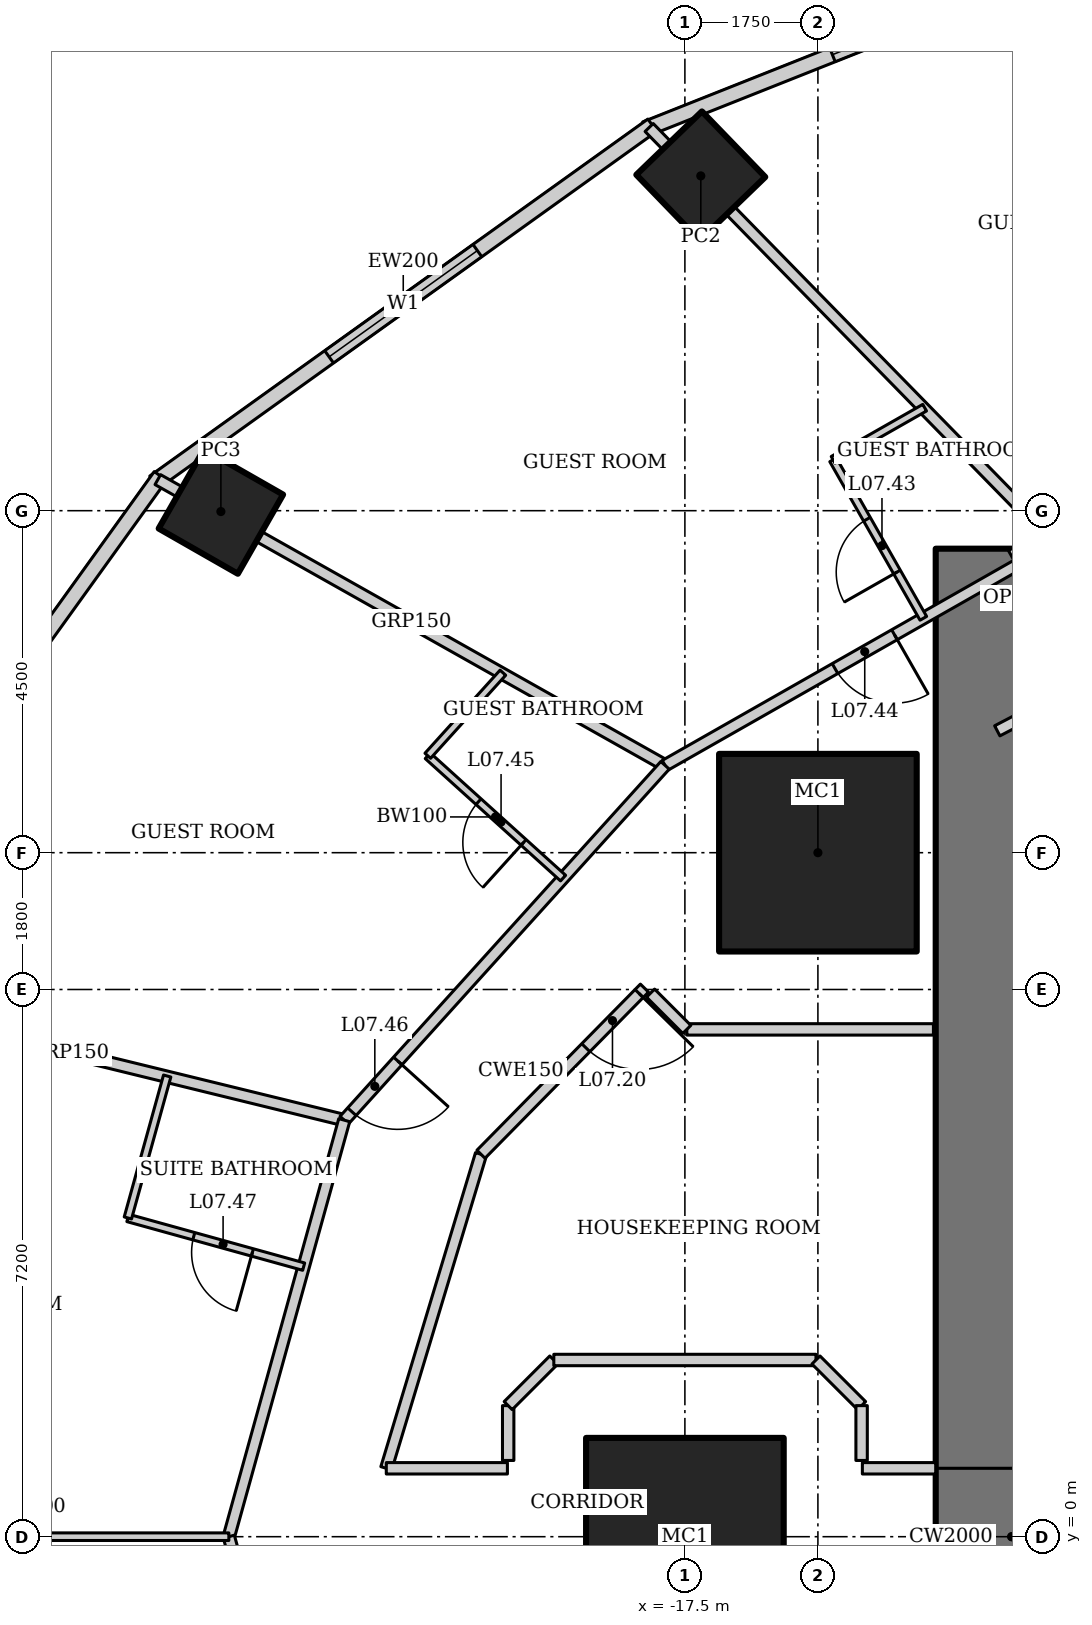
"""IFC4 building model, lengths in metres.
Left out: names, types, materials, properties, quantities, classifications, styles, units other than length and angle.
Written with IfcOpenShell. Run it as: python <this file> out.ifc"""

import sys

from ifc_helpers import new_model, si_unit, direction, frame, frame_2d, origin, origin_2d, place, context, subcontext, project, spatial, rectangle, hollow_rectangle, extrude, element, fill, save


model = new_model("IFC4")
c1 = context("Model", 3, precision=1e-05, world=origin(), true_north=direction((0.0, 1.0)))
c2 = subcontext(c1, "Body", "Model", "MODEL_VIEW")
j1 = project(units=[si_unit("LENGTHUNIT", "METRE"), si_unit("PLANEANGLEUNIT", "RADIAN")], contexts=[c1])
p1 = place(None, origin())
s1 = spatial("IfcSite", under=j1, at=p1, CompositionType="ELEMENT")
p2 = place(p1, origin())
s2 = spatial("IfcBuilding", under=s1, at=p2, CompositionType="ELEMENT")
p3 = place(p2, frame((0.0, 0.0, 40.6)))
s3 = spatial("IfcBuildingStorey", under=s2, at=p3, CompositionType="ELEMENT", Elevation=40.6)
for number, where, z_axis, x_axis in (
    (1, (-15.75, 9.0, 0.0), (0.0, 0.0, 1.0), (1.0, 0.0, 0.0)),
    (2, (-17.5, 0.0, 0.0), (0.0, 0.0, 1.0), (1.0, 0.0, 0.0)),
):
    element("IfcColumn", number, at=place(p3, frame(where, z_axis=z_axis, x_axis=x_axis)), inside=s3, PredefinedType="COLUMN", context=c2, shape_type="SweptSolid", body=[
        extrude(hollow_rectangle(XDim=2.6, YDim=2.6, WallThickness=0.13, at=origin_2d()), origin(), (0.0, 0.0, 1.0), 3.6),
    ])
p4 = place(p3, frame((-17.291, 17.905, 0.0), z_axis=(0.0, 0.0, 1.0), x_axis=(0.719339800339, 0.694658370459, 0.0)))
e3 = element("IfcColumn", 3, at=p4, inside=s3, PredefinedType="COLUMN", context=c2, shape_type="SweptSolid", body=[
    extrude(hollow_rectangle(XDim=1.2, YDim=1.2, WallThickness=0.1, at=origin_2d()), origin(), (0.0, 0.0, 1.0), 3.6),
])
p5 = place(p3, frame((-23.605, 13.489, 0.0), z_axis=(0.0, 0.0, 1.0), x_axis=(0.496139221777, 0.86824298017, 0.0)))
e4 = element("IfcColumn", 4, at=p5, inside=s3, PredefinedType="COLUMN", context=c2, shape_type="SweptSolid", body=[
    extrude(hollow_rectangle(XDim=1.2, YDim=1.2, WallThickness=0.12, at=origin_2d()), origin(), (0.0, 0.0, 1.0), 3.6),
])
p6 = place(p3, frame((-13.2, 13.0, 0.0), z_axis=(0.0, 0.0, 1.0), x_axis=(0.0, -1.0, 0.0)))
e5 = element("IfcWall", 5, at=p6, inside=s3, PredefinedType="SHEAR", context=c2, shape_type="SweptSolid", body=[
    extrude(rectangle(XDim=26.0, YDim=2.0, at=frame_2d((13.0, 0.0))), origin(), (0.0, 0.0, 1.0), 3.6),
])
p7 = place(p6, frame((12.1, 0.0, 0.0)))
e6 = element("IfcOpeningElement", 6, at=p7, cuts=e5, PredefinedType="OPENING", context=c2, shape_type="SweptSolid", body=[
    extrude(rectangle(XDim=1.8, YDim=2.1, at=frame_2d((0.9, 1.05))), frame((0.0, 1.01, 0.0), z_axis=(0.0, -1.0, 0.0), x_axis=(1.0, 0.0, 0.0)), (0.0, 0.0, 1.0), 2.02),
])
p8 = place(p3, frame((-10.869, 21.363, 0.0), z_axis=(0.0, 0.0, 1.0), x_axis=(-0.929358351251, -0.369178892895, 0.0)))
e7 = element("IfcWall", 7, at=p8, inside=s3, PredefinedType="SOLIDWALL", context=c2, shape_type="SweptSolid", body=[
    extrude(rectangle(XDim=7.692, YDim=0.2, at=frame_2d((3.846, 0.0))), origin(), (0.0, 0.0, 1.0), 3.45),
])
p9 = place(p8, frame((2.646, 0.0, 0.5)))
e8 = element("IfcOpeningElement", 8, at=p9, cuts=e7, PredefinedType="OPENING", context=c2, shape_type="SweptSolid", body=[
    extrude(rectangle(XDim=2.4, YDim=2.2, at=frame_2d((1.2, 1.1))), frame((0.0, 0.11, 0.0), z_axis=(0.0, -1.0, 0.0), x_axis=(1.0, 0.0, 0.0)), (0.0, 0.0, 1.0), 0.22),
])
p10 = place(p3, frame((-17.929, 18.572, 0.0), z_axis=(0.0, 0.0, 1.0), x_axis=(-0.812791321576, -0.582554948112, 0.0)))
e9 = element("IfcWall", 9, at=p10, inside=s3, PredefinedType="SOLIDWALL", context=c2, shape_type="SweptSolid", body=[
    extrude(rectangle(XDim=8.063, YDim=0.2, at=frame_2d((4.032, 0.0))), origin(), (0.0, 0.0, 1.0), 3.45),
])
p11 = place(p10, frame((2.832, 0.0, 0.5)))
e10 = element("IfcOpeningElement", 10, at=p11, cuts=e9, PredefinedType="OPENING", context=c2, shape_type="SweptSolid", body=[
    extrude(rectangle(XDim=2.4, YDim=2.2, at=frame_2d((1.2, 1.1))), frame((0.0, 0.11, 0.0), z_axis=(0.0, -1.0, 0.0), x_axis=(1.0, 0.0, 0.0)), (0.0, 0.0, 1.0), 0.22),
])
p12 = place(p3, frame((-24.4, 13.957, 0.0), z_axis=(0.0, 0.0, 1.0), x_axis=(-0.583937613703, -0.811798536155, 0.0)))
e11 = element("IfcWall", 11, at=p12, inside=s3, PredefinedType="SOLIDWALL", context=c2, shape_type="SweptSolid", body=[
    extrude(rectangle(XDim=8.323, YDim=0.2, at=frame_2d((4.162, 0.0))), origin(), (0.0, 0.0, 1.0), 3.45),
])
p13 = place(p12, frame((2.961, 0.0, 0.5)))
e12 = element("IfcOpeningElement", 12, at=p13, cuts=e11, PredefinedType="OPENING", context=c2, shape_type="SweptSolid", body=[
    extrude(rectangle(XDim=2.4, YDim=2.2, at=frame_2d((1.2, 1.1))), frame((0.0, 0.11, 0.0), z_axis=(0.0, -1.0, 0.0), x_axis=(1.0, 0.0, 0.0)), (0.0, 0.0, 1.0), 0.22),
])
p14 = place(p3, frame((-17.97, 18.542, 0.0), z_axis=(0.0, 0.0, 1.0), x_axis=(0.699032031211, -0.715090357467, 0.0)))
e13 = element("IfcWall", 13, at=p14, inside=s3, PredefinedType="PARTITIONING", context=c2, shape_type="SweptSolid", body=[
    extrude(rectangle(XDim=7.647, YDim=0.15, at=frame_2d((3.824, 0.0))), origin(), (0.0, 0.0, 1.0), 2.528),
])
p15 = place(p3, frame((-24.435, 13.909, 0.0), z_axis=(0.0, 0.0, 1.0), x_axis=(0.871267209855, -0.490808974074, 0.0)))
e14 = element("IfcWall", 14, at=p15, inside=s3, PredefinedType="PARTITIONING", context=c2, shape_type="SweptSolid", body=[
    extrude(rectangle(XDim=7.659, YDim=0.15, at=frame_2d((3.83, 0.0))), origin(), (0.0, 0.0, 1.0), 2.693),
])
p16 = place(p3, frame((-29.222, 7.254, 0.0), z_axis=(0.0, 0.0, 1.0), x_axis=(0.97130070913, -0.237854855832, 0.0)))
e15 = element("IfcWall", 15, at=p16, inside=s3, PredefinedType="PARTITIONING", context=c2, shape_type="SweptSolid", body=[
    extrude(rectangle(XDim=7.454, YDim=0.15, at=frame_2d((3.727, 0.0))), origin(), (0.0, 0.0, 1.0), 2.332),
])
p17 = place(p3, frame((-12.625, 13.073, 0.0), z_axis=(0.0, 0.0, 1.0), x_axis=(-0.86907565943, -0.494679187136, 0.0)))
e16 = element("IfcWall", 16, at=p17, inside=s3, PredefinedType="PARTITIONING", context=c2, shape_type="SweptSolid", body=[
    extrude(rectangle(XDim=5.911, YDim=0.15, at=frame_2d((2.955, 0.0))), origin(), (0.0, 0.0, 1.0), 3.45),
])
p18 = place(p17, frame((2.437, 0.0, 0.0)))
e17 = element("IfcOpeningElement", 17, at=p18, cuts=e16, PredefinedType="OPENING", context=c2, shape_type="SweptSolid", body=[
    extrude(rectangle(XDim=0.9, YDim=2.1, at=frame_2d((0.45, 1.05))), frame((0.0, 0.085, 0.0), z_axis=(0.0, -1.0, 0.0), x_axis=(1.0, 0.0, 0.0)), (0.0, 0.0, 1.0), 0.17),
])
p19 = place(p3, frame((-17.761, 10.149, 0.0), z_axis=(0.0, 0.0, 1.0), x_axis=(-0.670598380282, -0.741820606591, 0.0)))
e18 = element("IfcWall", 18, at=p19, inside=s3, PredefinedType="PARTITIONING", context=c2, shape_type="SweptSolid", body=[
    extrude(rectangle(XDim=6.293, YDim=0.15, at=frame_2d((3.147, 0.0))), origin(), (0.0, 0.0, 1.0), 3.45),
])
p20 = place(p19, frame((5.244, 0.0, 0.0)))
e19 = element("IfcOpeningElement", 19, at=p20, cuts=e18, PredefinedType="OPENING", context=c2, shape_type="SweptSolid", body=[
    extrude(rectangle(XDim=0.9, YDim=2.1, at=frame_2d((0.45, 1.05))), frame((0.0, 0.085, 0.0), z_axis=(0.0, -1.0, 0.0), x_axis=(1.0, 0.0, 0.0)), (0.0, 0.0, 1.0), 0.17),
])
p21 = place(p3, frame((-21.982, 5.481, 0.0), z_axis=(0.0, 0.0, 1.0), x_axis=(-0.266933062421, -0.963715072097, 0.0)))
e20 = element("IfcWall", 20, at=p21, inside=s3, PredefinedType="PARTITIONING", context=c2, shape_type="SweptSolid", body=[
    extrude(rectangle(XDim=5.687, YDim=0.15, at=frame_2d((2.844, 0.0))), origin(), (0.0, 0.0, 1.0), 3.45),
])
p22 = place(p3, frame((-23.5, 0.0, 0.0), z_axis=(0.0, 0.0, 1.0), x_axis=(0.266933062421, -0.963715072097, 0.0)))
e21 = element("IfcWall", 21, at=p22, inside=s3, PredefinedType="PARTITIONING", context=c2, shape_type="SweptSolid", body=[
    extrude(rectangle(XDim=5.687, YDim=0.15, at=frame_2d((2.844, 0.0))), origin(), (0.0, 0.0, 1.0), 3.45),
])
p23 = place(p22, frame((4.637, 0.0, 0.0)))
e22 = element("IfcOpeningElement", 22, at=p23, cuts=e21, PredefinedType="OPENING", context=c2, shape_type="SweptSolid", body=[
    extrude(rectangle(XDim=0.9, YDim=2.1, at=frame_2d((0.45, 1.05))), frame((0.0, 0.085, 0.0), z_axis=(0.0, -1.0, 0.0), x_axis=(1.0, 0.0, 0.0)), (0.0, 0.0, 1.0), 0.17),
])
p24 = place(p3, frame((-20.183, 5.032, 0.0), z_axis=(0.0, 0.0, 1.0), x_axis=(-0.288603524054, -0.957448696225, 0.0)))
e23 = element("IfcWall", 23, at=p24, inside=s3, PredefinedType="PARTITIONING", context=c2, shape_type="SweptSolid", body=[
    extrude(rectangle(XDim=4.316, YDim=0.15, at=frame_2d((2.158, 0.0))), origin(), (0.0, 0.0, 1.0), 3.45),
])
p25 = place(p3, frame((-14.363, 12.084, 0.0), z_axis=(0.0, 0.0, 1.0), x_axis=(-0.494703113698, 0.869062039959, 0.0)))
e24 = element("IfcWall", 24, at=p25, inside=s3, PredefinedType="PARTITIONING", context=c2, shape_type="SweptSolid", body=[
    extrude(rectangle(XDim=2.4, YDim=0.1, at=frame_2d((1.2, 0.0))), origin(), (0.0, 0.0, 1.0), 3.45),
])
p26 = place(p25, frame((0.7, 0.0, 0.0)))
e25 = element("IfcOpeningElement", 25, at=p26, cuts=e24, PredefinedType="OPENING", context=c2, shape_type="SweptSolid", body=[
    extrude(rectangle(XDim=0.8, YDim=2.1, at=frame_2d((0.4, 1.05))), frame((0.0, 0.06, 0.0), z_axis=(0.0, -1.0, 0.0), x_axis=(1.0, 0.0, 0.0)), (0.0, 0.0, 1.0), 0.12),
])
p27 = place(p3, frame((-15.55, 14.17, 0.0), z_axis=(0.0, 0.0, 1.0), x_axis=(0.869065896633, 0.494696338485, 0.0)))
e26 = element("IfcWall", 26, at=p27, inside=s3, PredefinedType="PARTITIONING", context=c2, shape_type="SweptSolid", body=[
    extrude(rectangle(XDim=1.386, YDim=0.1, at=frame_2d((0.693, 0.0))), origin(), (0.0, 0.0, 1.0), 3.45),
])
p28 = place(p3, frame((-19.103, 8.666, 0.0), z_axis=(0.0, 0.0, 1.0), x_axis=(-0.741861025859, 0.670553665496, 0.0)))
e27 = element("IfcWall", 27, at=p28, inside=s3, PredefinedType="PARTITIONING", context=c2, shape_type="SweptSolid", body=[
    extrude(rectangle(XDim=2.4, YDim=0.1, at=frame_2d((1.2, 0.0))), origin(), (0.0, 0.0, 1.0), 3.45),
])
p29 = place(p28, frame((0.7, 0.0, 0.0)))
e28 = element("IfcOpeningElement", 28, at=p29, cuts=e27, PredefinedType="OPENING", context=c2, shape_type="SweptSolid", body=[
    extrude(rectangle(XDim=0.8, YDim=2.1, at=frame_2d((0.4, 1.05))), frame((0.0, 0.06, 0.0), z_axis=(0.0, -1.0, 0.0), x_axis=(1.0, 0.0, 0.0)), (0.0, 0.0, 1.0), 0.12),
])
p30 = place(p3, frame((-20.883, 10.275, 0.0), z_axis=(0.0, 0.0, 1.0), x_axis=(0.670592268759, 0.7418261313, 0.0)))
e29 = element("IfcWall", 29, at=p30, inside=s3, PredefinedType="PARTITIONING", context=c2, shape_type="SweptSolid", body=[
    extrude(rectangle(XDim=1.474, YDim=0.1, at=frame_2d((0.737, 0.0))), origin(), (0.0, 0.0, 1.0), 3.45),
])
p31 = place(p3, frame((-22.516, 3.553, 0.0), z_axis=(0.0, 0.0, 1.0), x_axis=(-0.963711502417, 0.266945949788, 0.0)))
e30 = element("IfcWall", 30, at=p31, inside=s3, PredefinedType="PARTITIONING", context=c2, shape_type="SweptSolid", body=[
    extrude(rectangle(XDim=2.4, YDim=0.1, at=frame_2d((1.2, 0.0))), origin(), (0.0, 0.0, 1.0), 3.45),
])
p32 = place(p31, frame((0.7, 0.0, 0.0)))
e31 = element("IfcOpeningElement", 31, at=p32, cuts=e30, PredefinedType="OPENING", context=c2, shape_type="SweptSolid", body=[
    extrude(rectangle(XDim=0.8, YDim=2.1, at=frame_2d((0.4, 1.05))), frame((0.0, 0.06, 0.0), z_axis=(0.0, -1.0, 0.0), x_axis=(1.0, 0.0, 0.0)), (0.0, 0.0, 1.0), 0.12),
])
p33 = place(p3, frame((-24.829, 4.194, 0.0), z_axis=(0.0, 0.0, 1.0), x_axis=(0.266942084007, 0.963712573222, 0.0)))
e32 = element("IfcWall", 32, at=p33, inside=s3, PredefinedType="PARTITIONING", context=c2, shape_type="SweptSolid", body=[
    extrude(rectangle(XDim=1.938, YDim=0.1, at=frame_2d((0.969, 0.0))), origin(), (0.0, 0.0, 1.0), 3.45),
])
p34 = place(p3, frame((-29.4, 0.0, 0.0), z_axis=(0.0, 0.0, 1.0), x_axis=(1.0, 0.0, 0.0)))
e33 = element("IfcWall", 33, at=p34, inside=s3, PredefinedType="PARTITIONING", context=c2, shape_type="SweptSolid", body=[
    extrude(rectangle(XDim=5.9, YDim=0.1, at=frame_2d((2.95, 0.0))), origin(), (0.0, 0.0, 1.0), 2.528),
])
p35 = place(p34, frame((2.5, 0.0, 0.0)))
e34 = element("IfcOpeningElement", 34, at=p35, cuts=e33, PredefinedType="OPENING", context=c2, shape_type="SweptSolid", body=[
    extrude(rectangle(XDim=0.9, YDim=2.1, at=frame_2d((0.45, 1.05))), frame((0.0, 0.06, 0.0), z_axis=(0.0, -1.0, 0.0), x_axis=(1.0, 0.0, 0.0)), (0.0, 0.0, 1.0), 0.12),
])
p36 = place(p3, frame((-13.2, 13.0, 0.0), z_axis=(0.0, 0.0, 1.0), x_axis=(0.49435138335, -0.869262164011, 0.0)))
e35 = element("IfcWall", 35, at=p36, inside=s3, PredefinedType="PARTITIONING", context=c2, shape_type="SweptSolid", body=[
    extrude(rectangle(XDim=0.221, YDim=0.1, at=frame_2d((0.11, 0.0))), origin(), (0.0, 0.0, 1.0), 3.45),
])
p37 = place(p3, frame((-14.2, 0.9, 0.0), z_axis=(0.0, 0.0, 1.0), x_axis=(-1.0, 0.0, 0.0)))
e36 = element("IfcWall", 36, at=p37, inside=s3, PredefinedType="PARTITIONING", context=c2, shape_type="SweptSolid", body=[
    extrude(rectangle(XDim=0.965, YDim=0.15, at=frame_2d((0.482, 0.0))), origin(), (0.0, 0.0, 1.0), 3.45),
])
p38 = place(p3, frame((-19.835, 0.9, 0.0), z_axis=(0.0, 0.0, 1.0), x_axis=(-1.0, 0.0, 0.0)))
e37 = element("IfcWall", 37, at=p38, inside=s3, PredefinedType="PARTITIONING", context=c2, shape_type="SweptSolid", body=[
    extrude(rectangle(XDim=1.594, YDim=0.15, at=frame_2d((0.797, 0.0))), origin(), (0.0, 0.0, 1.0), 3.45),
])
p39 = place(p3, frame((-19.825, 1.003, 0.0), z_axis=(0.0, 0.0, 1.0), x_axis=(0.0, 1.0, 0.0)))
e38 = element("IfcWall", 38, at=p39, inside=s3, PredefinedType="PARTITIONING", context=c2, shape_type="SweptSolid", body=[
    extrude(rectangle(XDim=0.721, YDim=0.15, at=frame_2d((0.361, 0.0))), origin(), (0.0, 0.0, 1.0), 3.45),
])
p40 = place(p3, frame((-19.825, 1.725, 0.0), z_axis=(0.0, 0.0, 1.0), x_axis=(0.707106781187, 0.707106781187, 0.0)))
e39 = element("IfcWall", 39, at=p40, inside=s3, PredefinedType="PARTITIONING", context=c2, shape_type="SweptSolid", body=[
    extrude(rectangle(XDim=0.849, YDim=0.15, at=frame_2d((0.425, 0.0))), origin(), (0.0, 0.0, 1.0), 3.45),
])
p41 = place(p3, frame((-19.225, 2.325, 0.0), z_axis=(0.0, 0.0, 1.0), x_axis=(1.0, 0.0, 0.0)))
e40 = element("IfcWall", 40, at=p41, inside=s3, PredefinedType="PARTITIONING", context=c2, shape_type="SweptSolid", body=[
    extrude(rectangle(XDim=3.449, YDim=0.15, at=frame_2d((1.725, 0.0))), origin(), (0.0, 0.0, 1.0), 3.45),
])
p42 = place(p3, frame((-15.775, 2.325, 0.0), z_axis=(0.0, 0.0, 1.0), x_axis=(0.707106781187, -0.707106781187, 0.0)))
e41 = element("IfcWall", 41, at=p42, inside=s3, PredefinedType="PARTITIONING", context=c2, shape_type="SweptSolid", body=[
    extrude(rectangle(XDim=0.849, YDim=0.15, at=frame_2d((0.425, 0.0))), origin(), (0.0, 0.0, 1.0), 3.45),
])
p43 = place(p3, frame((-15.175, 1.725, 0.0), z_axis=(0.0, 0.0, 1.0), x_axis=(0.0, -1.0, 0.0)))
e42 = element("IfcWall", 42, at=p43, inside=s3, PredefinedType="PARTITIONING", context=c2, shape_type="SweptSolid", body=[
    extrude(rectangle(XDim=0.721, YDim=0.15, at=frame_2d((0.361, 0.0))), origin(), (0.0, 0.0, 1.0), 3.45),
])
p44 = place(p3, frame((-11.296, 11.698, 0.0), z_axis=(0.0, 0.0, 1.0), x_axis=(-0.886306431218, -0.463099244203, 0.0)))
e43 = element("IfcWall", 43, at=p44, inside=s3, PredefinedType="PARTITIONING", context=c2, shape_type="SweptSolid", body=[
    extrude(rectangle(XDim=2.362, YDim=0.15, at=frame_2d((1.181, 0.0))), origin(), (0.0, 0.0, 1.0), 3.45),
])
p45 = place(p3, frame((-18.032, 7.218, 0.0), z_axis=(0.0, 0.0, 1.0), x_axis=(-0.701392176983, -0.712775570616, 0.0)))
e44 = element("IfcWall", 44, at=p45, inside=s3, PredefinedType="PARTITIONING", context=c2, shape_type="SweptSolid", body=[
    extrude(rectangle(XDim=3.067, YDim=0.15, at=frame_2d((1.533, 0.0))), origin(), (0.0, 0.0, 1.0), 3.45),
])
p46 = place(p45, frame((0.1, 0.0, 0.0)))
e45 = element("IfcOpeningElement", 45, at=p46, cuts=e44, PredefinedType="OPENING", context=c2, shape_type="SweptSolid", body=[
    extrude(rectangle(XDim=1.0, YDim=2.1, at=frame_2d((0.5, 1.05))), frame((0.0, 0.085, 0.0), z_axis=(0.0, -1.0, 0.0), x_axis=(1.0, 0.0, 0.0)), (0.0, 0.0, 1.0), 0.17),
])
p47 = place(p3, frame((-14.23, 6.675, 0.0), z_axis=(0.0, 0.0, 1.0), x_axis=(-1.0, 0.0, 0.0)))
e46 = element("IfcWall", 46, at=p47, inside=s3, PredefinedType="PARTITIONING", context=c2, shape_type="SweptSolid", body=[
    extrude(rectangle(XDim=3.245, YDim=0.15, at=frame_2d((1.622, 0.0))), origin(), (0.0, 0.0, 1.0), 3.45),
])
p48 = place(p3, frame((-17.475, 6.675, 0.0), z_axis=(0.0, 0.0, 1.0), x_axis=(-0.707106781187, 0.707106781187, 0.0)))
e47 = element("IfcWall", 47, at=p48, inside=s3, PredefinedType="PARTITIONING", context=c2, shape_type="SweptSolid", body=[
    extrude(rectangle(XDim=0.675, YDim=0.15, at=frame_2d((0.337, 0.0))), origin(), (0.0, 0.0, 1.0), 3.45),
])
p49 = place(p9, origin())
e48 = element("IfcWindow", 48, at=p49, inside=s3, PartitioningType="SINGLE_PANEL", PredefinedType="WINDOW", context=c2, shape_type="SweptSolid", body=[
    extrude(rectangle(XDim=2.4, YDim=2.2, at=frame_2d((1.2, 1.1))), frame((0.0, 0.03, 0.0), z_axis=(0.0, -1.0, 0.0), x_axis=(1.0, 0.0, 0.0)), (0.0, 0.0, 1.0), 0.06),
])
fill(e8, e48)
p50 = place(p11, origin())
e49 = element("IfcWindow", 49, at=p50, inside=s3, PartitioningType="SINGLE_PANEL", PredefinedType="WINDOW", context=c2, shape_type="SweptSolid", body=[
    extrude(rectangle(XDim=2.4, YDim=2.2, at=frame_2d((1.2, 1.1))), frame((0.0, 0.03, 0.0), z_axis=(0.0, -1.0, 0.0), x_axis=(1.0, 0.0, 0.0)), (0.0, 0.0, 1.0), 0.06),
])
fill(e10, e49)
p51 = place(p7, origin())
e50 = element("IfcDoor", 50, at=p51, inside=s3, OperationType="DOUBLE_DOOR_DOUBLE_SWING", PredefinedType="DOOR", context=c2, shape_type="SweptSolid", body=[
    extrude(rectangle(XDim=1.8, YDim=2.1, at=frame_2d((0.9, 1.05))), frame((0.0, 0.025, 0.0), z_axis=(0.0, -1.0, 0.0), x_axis=(1.0, 0.0, 0.0)), (0.0, 0.0, 1.0), 0.05),
])
fill(e6, e50)
p52 = place(p46, origin())
e51 = element("IfcDoor", 51, at=p52, inside=s3, OperationType="SINGLE_SWING_LEFT", PredefinedType="DOOR", context=c2, shape_type="SweptSolid", body=[
    extrude(rectangle(XDim=1.0, YDim=2.1, at=frame_2d((0.5, 1.05))), frame((0.0, 0.025, 0.0), z_axis=(0.0, -1.0, 0.0), x_axis=(1.0, 0.0, 0.0)), (0.0, 0.0, 1.0), 0.05),
])
fill(e45, e51)
p53 = place(p26, origin())
e52 = element("IfcDoor", 52, at=p53, inside=s3, OperationType="SINGLE_SWING_LEFT", PredefinedType="DOOR", context=c2, shape_type="SweptSolid", body=[
    extrude(rectangle(XDim=0.8, YDim=2.1, at=frame_2d((0.4, 1.05))), frame((0.0, 0.025, 0.0), z_axis=(0.0, -1.0, 0.0), x_axis=(1.0, 0.0, 0.0)), (0.0, 0.0, 1.0), 0.05),
])
fill(e25, e52)
p54 = place(p18, origin())
e53 = element("IfcDoor", 53, at=p54, inside=s3, OperationType="SINGLE_SWING_LEFT", PredefinedType="DOOR", context=c2, shape_type="SweptSolid", body=[
    extrude(rectangle(XDim=0.9, YDim=2.1, at=frame_2d((0.45, 1.05))), frame((0.0, 0.025, 0.0), z_axis=(0.0, -1.0, 0.0), x_axis=(1.0, 0.0, 0.0)), (0.0, 0.0, 1.0), 0.05),
])
fill(e17, e53)
p55 = place(p29, origin())
e54 = element("IfcDoor", 54, at=p55, inside=s3, OperationType="SINGLE_SWING_LEFT", PredefinedType="DOOR", context=c2, shape_type="SweptSolid", body=[
    extrude(rectangle(XDim=0.8, YDim=2.1, at=frame_2d((0.4, 1.05))), frame((0.0, 0.025, 0.0), z_axis=(0.0, -1.0, 0.0), x_axis=(1.0, 0.0, 0.0)), (0.0, 0.0, 1.0), 0.05),
])
fill(e28, e54)
p56 = place(p20, origin())
e55 = element("IfcDoor", 55, at=p56, inside=s3, OperationType="SINGLE_SWING_LEFT", PredefinedType="DOOR", context=c2, shape_type="SweptSolid", body=[
    extrude(rectangle(XDim=0.9, YDim=2.1, at=frame_2d((0.45, 1.05))), frame((0.0, 0.025, 0.0), z_axis=(0.0, -1.0, 0.0), x_axis=(1.0, 0.0, 0.0)), (0.0, 0.0, 1.0), 0.05),
])
fill(e19, e55)
p57 = place(p32, origin())
e56 = element("IfcDoor", 56, at=p57, inside=s3, OperationType="SINGLE_SWING_LEFT", PredefinedType="DOOR", context=c2, shape_type="SweptSolid", body=[
    extrude(rectangle(XDim=0.8, YDim=2.1, at=frame_2d((0.4, 1.05))), frame((0.0, 0.025, 0.0), z_axis=(0.0, -1.0, 0.0), x_axis=(1.0, 0.0, 0.0)), (0.0, 0.0, 1.0), 0.05),
])
fill(e31, e56)
save(model, sys.argv[1])
